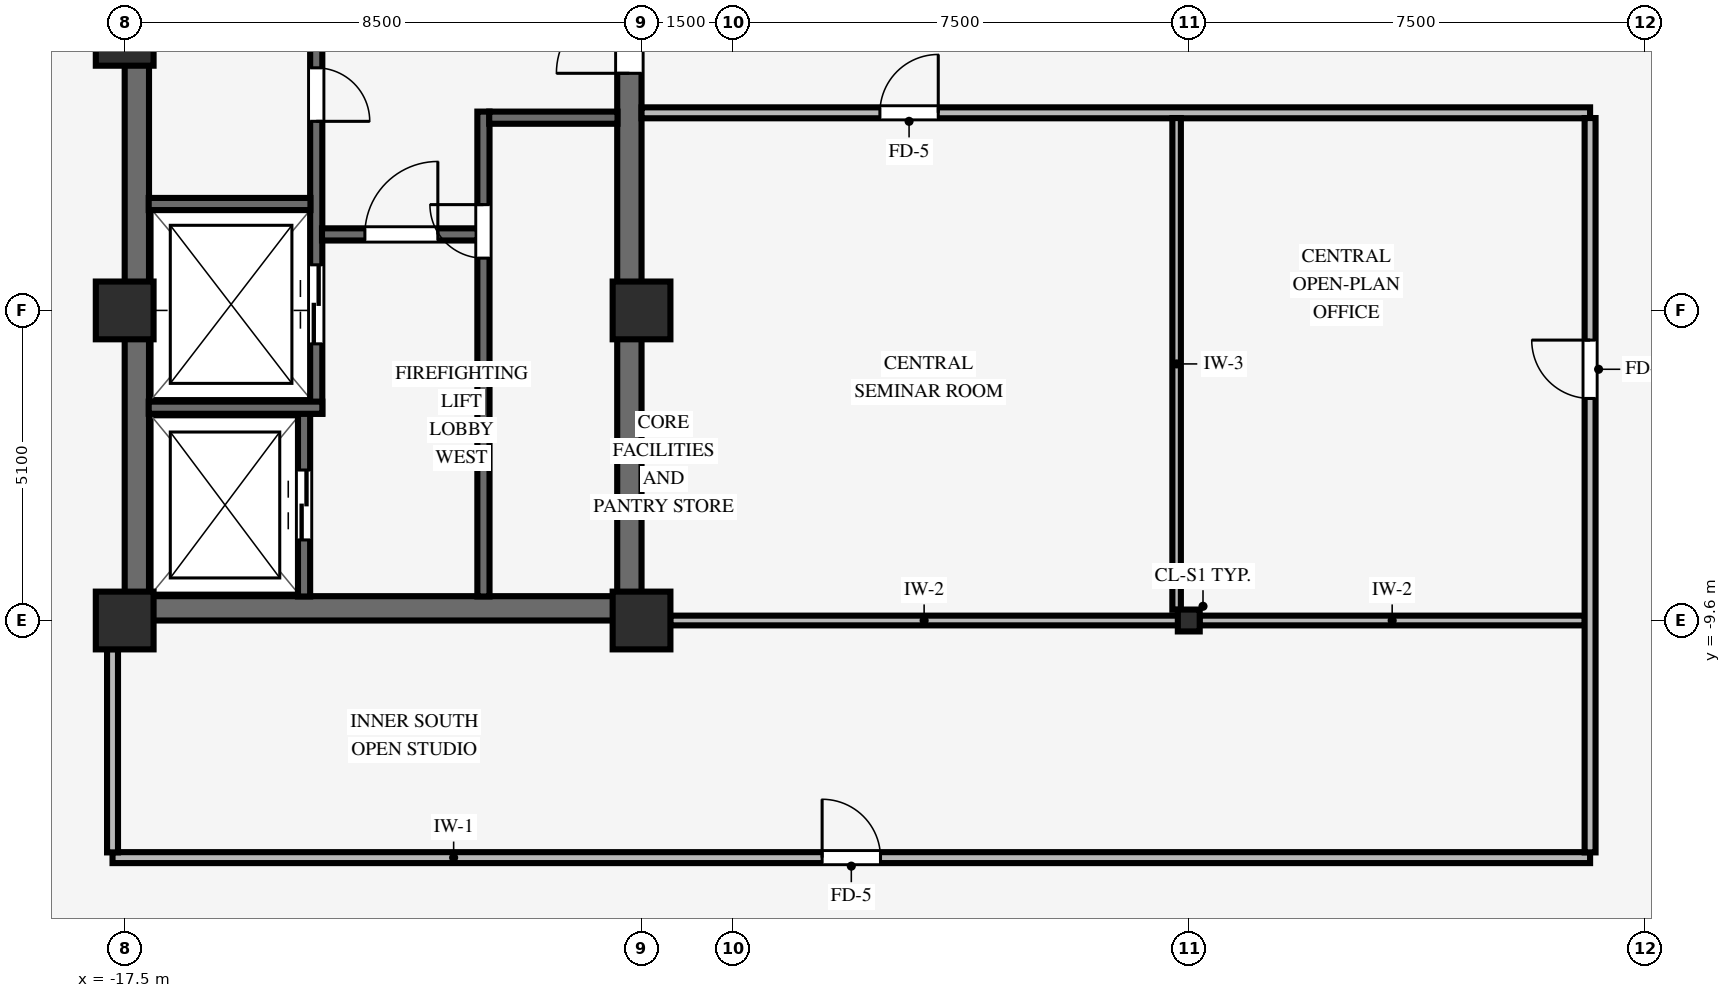
"""IFC4 building model, lengths in metres.
Left out: names, types, materials, properties, quantities, classifications, styles, units other than length and angle.
Written with IfcOpenShell. Run it as: python <this file> out.ifc"""

import sys

from ifc_helpers import new_model, si_unit, direction, frame, frame_2d, origin, origin_2d, place, context, subcontext, project, spatial, rectangle, i_section, extrude, source, transform, mapped, element, fill, save


model = new_model("IFC4")
c1 = context("Model", 3, precision=1e-05, world=origin(), true_north=direction((0.0, 1.0)))
c2 = subcontext(c1, "Body", "Model", "MODEL_VIEW")
j1 = project(units=[si_unit("LENGTHUNIT", "METRE"), si_unit("PLANEANGLEUNIT", "RADIAN")], contexts=[c1])
p1 = place(None, origin())
s1 = spatial("IfcSite", under=j1, at=p1, CompositionType="ELEMENT")
p2 = place(p1, origin())
s2 = spatial("IfcBuilding", under=s1, at=p2, CompositionType="ELEMENT")
p3 = place(p2, frame((0.0, 0.0, 142.1)))
s3 = spatial("IfcBuildingStorey", under=s2, at=p3, CompositionType="ELEMENT", Elevation=142.1)
p4 = place(p3, frame((-17.5, -9.4, 0.0), z_axis=(0.0, 0.0, 1.0), x_axis=(1.0, 0.0, 0.0)))
e1 = element("IfcWall", 1, at=p4, inside=s3, PredefinedType="SHEAR", context=c2, shape_type="SweptSolid", body=[
    extrude(rectangle(XDim=8.5, YDim=0.4, at=frame_2d((4.25, 0.0))), origin(), (0.0, 0.0, 1.0), 3.37),
])
p5 = place(p3, frame((-17.3, -9.205, 0.0), z_axis=(0.0, 0.0, 1.0), x_axis=(0.0, 1.0, 0.0)))
e2 = element("IfcWall", 2, at=p5, inside=s3, PredefinedType="SHEAR", context=c2, shape_type="SweptSolid", body=[
    extrude(rectangle(XDim=18.41, YDim=0.4, at=frame_2d((9.205, 0.0))), origin(), (0.0, 0.0, 1.0), 3.37),
])
p6 = place(p3, frame((-9.2, -9.205, 0.0), z_axis=(0.0, 0.0, 1.0), x_axis=(0.0, 1.0, 0.0)))
e3 = element("IfcWall", 3, at=p6, inside=s3, PredefinedType="SHEAR", context=c2, shape_type="SweptSolid", body=[
    extrude(rectangle(XDim=18.41, YDim=0.4, at=frame_2d((9.205, 0.0))), origin(), (0.0, 0.0, 1.0), 3.37),
])
p7 = place(p6, frame((8.605, 0.0, 0.0)))
e4 = element("IfcOpeningElement", 4, at=p7, cuts=e3, PredefinedType="OPENING", context=c2, shape_type="SweptSolid", body=[
    extrude(rectangle(XDim=1.2, YDim=2.15, at=frame_2d((0.6, 1.075))), frame((0.0, 0.21, 0.0), z_axis=(0.0, -1.0, 0.0), x_axis=(1.0, 0.0, 0.0)), (0.0, 0.0, 1.0), 0.42),
])
for number, where, z_axis, x_axis in (
    (5, (-17.5, -9.6, 0.0), (0.0, 0.0, 1.0), (1.0, 0.0, 0.0)),
    (6, (-17.5, -4.5, 0.0), (0.0, 0.0, 1.0), (1.0, 0.0, 0.0)),
    (7, (-9.0, -9.6, 0.0), (0.0, 0.0, 1.0), (1.0, 0.0, 0.0)),
    (8, (-9.0, -4.5, 0.0), (0.0, 0.0, 1.0), (1.0, 0.0, 0.0)),
    (9, (-17.5, 0.0, 0.0), (0.0, 0.0, 1.0), (1.0, 0.0, 0.0)),
):
    element("IfcColumn", number, at=place(p3, frame(where, z_axis=z_axis, x_axis=x_axis)), inside=s3, PredefinedType="COLUMN", context=c2, shape_type="SweptSolid", body=[
        extrude(rectangle(XDim=0.95, YDim=0.95, at=origin_2d()), origin(), (0.0, 0.0, 1.0), 3.37),
    ])
p8 = place(p3, frame((0.0, -9.6, 0.0), z_axis=(0.0, 0.0, 1.0), x_axis=(1.0, 0.0, 0.0)))
e10 = element("IfcColumn", 10, at=p8, inside=s3, PredefinedType="COLUMN", context=c2, shape_type="SweptSolid", body=[
    extrude(i_section(OverallWidth=0.36, OverallDepth=0.36, WebThickness=0.021, FlangeThickness=0.021, FilletRadius=0.018, at=origin_2d()), origin(), (0.0, 0.0, 1.0), 3.37),
])
p9 = place(p3, frame((-14.55, -9.205, 0.0), z_axis=(0.0, 0.0, 1.0), x_axis=(0.0, 1.0, 0.0)))
e11 = element("IfcWall", 11, at=p9, inside=s3, PredefinedType="SHEAR", context=c2, shape_type="SweptSolid", body=[
    extrude(rectangle(XDim=3.01, YDim=0.2, at=frame_2d((1.505, 0.0))), origin(), (0.0, 0.0, 1.0), 3.37),
])
p10 = place(p9, frame((0.93, 0.0, 0.0)))
e12 = element("IfcOpeningElement", 12, at=p10, cuts=e11, PredefinedType="OPENING", context=c2, shape_type="SweptSolid", body=[
    extrude(rectangle(XDim=1.15, YDim=2.15, at=frame_2d((0.575, 1.075))), frame((0.0, 0.11, 0.0), z_axis=(0.0, -1.0, 0.0), x_axis=(1.0, 0.0, 0.0)), (0.0, 0.0, 1.0), 0.22),
])
p11 = place(p3, frame((-14.35, -6.2, 0.0), z_axis=(0.0, 0.0, 1.0), x_axis=(0.0, 1.0, 0.0)))
e13 = element("IfcWall", 13, at=p11, inside=s3, PredefinedType="SHEAR", context=c2, shape_type="SweptSolid", body=[
    extrude(rectangle(XDim=7.105, YDim=0.2, at=frame_2d((3.552, 0.0))), origin(), (0.0, 0.0, 1.0), 3.37),
])
p12 = place(p11, frame((5.69, 0.0, 0.0), z_axis=(0.0, 0.0, 1.0), x_axis=(-1.0, 0.0, 0.0)))
e14 = element("IfcOpeningElement", 14, at=p12, cuts=e13, PredefinedType="OPENING", context=c2, shape_type="SweptSolid", body=[
    extrude(rectangle(XDim=0.88, YDim=2.1, at=frame_2d((0.44, 1.05))), frame((0.0, 0.11, 0.0), z_axis=(0.0, -1.0, 0.0), x_axis=(1.0, 0.0, 0.0)), (0.0, 0.0, 1.0), 0.22),
])
p13 = place(p11, frame((1.15, 0.0, 0.0)))
e15 = element("IfcOpeningElement", 15, at=p13, cuts=e13, PredefinedType="OPENING", context=c2, shape_type="SweptSolid", body=[
    extrude(rectangle(XDim=1.3, YDim=2.2, at=frame_2d((0.65, 1.1))), frame((0.0, 0.11, 0.0), z_axis=(0.0, -1.0, 0.0), x_axis=(1.0, 0.0, 0.0)), (0.0, 0.0, 1.0), 0.22),
])
p14 = place(p3, frame((-17.105, -6.1, 0.0), z_axis=(0.0, 0.0, 1.0), x_axis=(1.0, 0.0, 0.0)))
e16 = element("IfcWall", 16, at=p14, inside=s3, PredefinedType="SHEAR", context=c2, shape_type="SweptSolid", body=[
    extrude(rectangle(XDim=2.855, YDim=0.2, at=frame_2d((1.427, 0.0))), origin(), (0.0, 0.0, 1.0), 3.37),
])
p15 = place(p3, frame((-17.105, -2.75, 0.0), z_axis=(0.0, 0.0, 1.0), x_axis=(1.0, 0.0, 0.0)))
e17 = element("IfcWall", 17, at=p15, inside=s3, PredefinedType="SHEAR", context=c2, shape_type="SweptSolid", body=[
    extrude(rectangle(XDim=2.66, YDim=0.2, at=frame_2d((1.33, 0.0))), origin(), (0.0, 0.0, 1.0), 3.37),
])
p16 = place(p3, frame((-11.6, -9.205, 0.0), z_axis=(0.0, 0.0, 1.0), x_axis=(0.0, 1.0, 0.0)))
e18 = element("IfcWall", 18, at=p16, inside=s3, PredefinedType="SHEAR", context=c2, shape_type="SweptSolid", body=[
    extrude(rectangle(XDim=7.975, YDim=0.2, at=frame_2d((3.988, 0.0))), origin(), (0.0, 0.0, 1.0), 3.37),
])
p17 = place(p16, frame((5.565, 0.0, 0.0)))
e19 = element("IfcOpeningElement", 19, at=p17, cuts=e18, PredefinedType="OPENING", context=c2, shape_type="SweptSolid", body=[
    extrude(rectangle(XDim=0.88, YDim=2.1, at=frame_2d((0.44, 1.05))), frame((0.0, 0.11, 0.0), z_axis=(0.0, -1.0, 0.0), x_axis=(1.0, 0.0, 0.0)), (0.0, 0.0, 1.0), 0.22),
])
p18 = place(p3, frame((-14.255, -3.25, 0.0), z_axis=(0.0, 0.0, 1.0), x_axis=(1.0, 0.0, 0.0)))
e20 = element("IfcWall", 20, at=p18, inside=s3, PredefinedType="SHEAR", context=c2, shape_type="SweptSolid", body=[
    extrude(rectangle(XDim=2.56, YDim=0.2, at=frame_2d((1.28, 0.0))), origin(), (0.0, 0.0, 1.0), 3.37),
])
p19 = place(p18, frame((0.705, 0.0, 0.0)))
e21 = element("IfcOpeningElement", 21, at=p19, cuts=e20, PredefinedType="OPENING", context=c2, shape_type="SweptSolid", body=[
    extrude(rectangle(XDim=1.2, YDim=2.15, at=frame_2d((0.6, 1.075))), frame((0.0, 0.11, 0.0), z_axis=(0.0, -1.0, 0.0), x_axis=(1.0, 0.0, 0.0)), (0.0, 0.0, 1.0), 0.22),
])
p20 = place(p3, frame((-11.505, -1.33, 0.0), z_axis=(0.0, 0.0, 1.0), x_axis=(1.0, 0.0, 0.0)))
e22 = element("IfcWall", 22, at=p20, inside=s3, PredefinedType="SHEAR", context=c2, shape_type="SweptSolid", body=[
    extrude(rectangle(XDim=2.11, YDim=0.2, at=frame_2d((1.055, 0.0))), origin(), (0.0, 0.0, 1.0), 3.37),
])
p21 = place(p3, frame((-17.7, -13.5, 0.0), z_axis=(0.0, 0.0, 1.0), x_axis=(1.0, 0.0, 0.0)))
e23 = element("IfcWall", 23, at=p21, inside=s3, PredefinedType="PARTITIONING", context=c2, shape_type="SweptSolid", body=[
    extrude(rectangle(XDim=24.3, YDim=0.18, at=frame_2d((12.15, 0.0))), origin(), (0.0, 0.0, 1.0), 2.998),
])
p22 = place(p21, frame((11.67, 0.0, 0.0)))
e24 = element("IfcOpeningElement", 24, at=p22, cuts=e23, PredefinedType="OPENING", context=c2, shape_type="SweptSolid", body=[
    extrude(rectangle(XDim=0.96, YDim=2.1, at=frame_2d((0.48, 1.05))), frame((0.0, 0.1, 0.0), z_axis=(0.0, -1.0, 0.0), x_axis=(1.0, 0.0, 0.0)), (0.0, 0.0, 1.0), 0.2),
])
p23 = place(p3, frame((-8.529, -9.6, 0.0), z_axis=(0.0, 0.0, 1.0), x_axis=(1.0, 0.0, 0.0)))
e25 = element("IfcWall", 25, at=p23, inside=s3, PredefinedType="PARTITIONING", context=c2, shape_type="SweptSolid", body=[
    extrude(rectangle(XDim=8.353, YDim=0.16, at=frame_2d((4.177, 0.0))), origin(), (0.0, 0.0, 1.0), 2.405),
])
p24 = place(p3, frame((0.176, -9.6, 0.0), z_axis=(0.0, 0.0, 1.0), x_axis=(1.0, 0.0, 0.0)))
e26 = element("IfcWall", 26, at=p24, inside=s3, PredefinedType="PARTITIONING", context=c2, shape_type="SweptSolid", body=[
    extrude(rectangle(XDim=6.338, YDim=0.16, at=frame_2d((3.169, 0.0))), origin(), (0.0, 0.0, 1.0), 2.405),
])
p25 = place(p3, frame((-9.0, -1.25, 0.0), z_axis=(0.0, 0.0, 1.0), x_axis=(1.0, 0.0, 0.0)))
e27 = element("IfcWall", 27, at=p25, inside=s3, PredefinedType="PARTITIONING", context=c2, shape_type="SweptSolid", body=[
    extrude(rectangle(XDim=15.6, YDim=0.18, at=frame_2d((7.8, 0.0))), origin(), (0.0, 0.0, 1.0), 3.36),
])
p26 = place(p25, frame((3.92, 0.0, 0.0)))
e28 = element("IfcOpeningElement", 28, at=p26, cuts=e27, PredefinedType="OPENING", context=c2, shape_type="SweptSolid", body=[
    extrude(rectangle(XDim=0.96, YDim=2.1, at=frame_2d((0.48, 1.05))), frame((0.0, 0.1, 0.0), z_axis=(0.0, -1.0, 0.0), x_axis=(1.0, 0.0, 0.0)), (0.0, 0.0, 1.0), 0.2),
])
p27 = place(p3, frame((-17.7, -13.414, 0.0), z_axis=(0.0, 0.0, 1.0), x_axis=(0.0, 1.0, 0.0)))
e29 = element("IfcWall", 29, at=p27, inside=s3, PredefinedType="PARTITIONING", context=c2, shape_type="SweptSolid", body=[
    extrude(rectangle(XDim=3.343, YDim=0.18, at=frame_2d((1.671, 0.0))), origin(), (0.0, 0.0, 1.0), 2.816),
])
p28 = place(p3, frame((-0.2, -9.424, 0.0), z_axis=(0.0, 0.0, 1.0), x_axis=(0.0, 1.0, 0.0)))
e30 = element("IfcWall", 30, at=p28, inside=s3, PredefinedType="PARTITIONING", context=c2, shape_type="SweptSolid", body=[
    extrude(rectangle(XDim=8.088, YDim=0.14, at=frame_2d((4.044, 0.0))), origin(), (0.0, 0.0, 1.0), 2.816),
])
p29 = place(p3, frame((6.6, -13.414, 0.0), z_axis=(0.0, 0.0, 1.0), x_axis=(0.0, 1.0, 0.0)))
e31 = element("IfcWall", 31, at=p29, inside=s3, PredefinedType="PARTITIONING", context=c2, shape_type="SweptSolid", body=[
    extrude(rectangle(XDim=12.078, YDim=0.18, at=frame_2d((6.039, 0.0))), origin(), (0.0, 0.0, 1.0), 3.36),
])
p30 = place(p29, frame((7.466, 0.0, 0.0)))
e32 = element("IfcOpeningElement", 32, at=p30, cuts=e31, PredefinedType="OPENING", context=c2, shape_type="SweptSolid", body=[
    extrude(rectangle(XDim=0.96, YDim=2.1, at=frame_2d((0.48, 1.05))), frame((0.0, 0.1, 0.0), z_axis=(0.0, -1.0, 0.0), x_axis=(1.0, 0.0, 0.0)), (0.0, 0.0, 1.0), 0.2),
])
m1 = source(origin(), c2, "Body", "SweptSolid", [
    extrude(rectangle(XDim=0.88, YDim=2.1, at=frame_2d((0.44, 1.05))), frame((0.0, 0.025, 0.0), z_axis=(0.0, -1.0, 0.0), x_axis=(1.0, 0.0, 0.0)), (0.0, 0.0, 1.0), 0.05),
])
p31 = place(p12, origin())
e33 = element("IfcDoor", 33, at=p31, inside=s3, OperationType="SINGLE_SWING_RIGHT", PredefinedType="DOOR", context=c2, shape_type="MappedRepresentation", body=[
    mapped(m1, transform((0.0, 0.0, 0.0), scale=1.0)),
])
fill(e14, e33)
m2 = source(origin(), c2, "Body", "SweptSolid", [
    extrude(rectangle(XDim=1.2, YDim=2.15, at=frame_2d((0.6, 1.075))), frame((0.0, 0.025, 0.0), z_axis=(0.0, -1.0, 0.0), x_axis=(1.0, 0.0, 0.0)), (0.0, 0.0, 1.0), 0.05),
])
p32 = place(p19, origin())
e34 = element("IfcDoor", 34, at=p32, inside=s3, OperationType="SINGLE_SWING_RIGHT", PredefinedType="DOOR", context=c2, shape_type="MappedRepresentation", body=[
    mapped(m2, transform((0.0, 0.0, 0.0), scale=1.0)),
])
fill(e21, e34)
p33 = place(p17, origin())
e35 = element("IfcDoor", 35, at=p33, inside=s3, OperationType="SINGLE_SWING_RIGHT", PredefinedType="DOOR", context=c2, shape_type="MappedRepresentation", body=[
    mapped(m1, transform((0.0, 0.0, 0.0), scale=1.0)),
])
fill(e19, e35)
p34 = place(p7, origin())
e36 = element("IfcDoor", 36, at=p34, inside=s3, OperationType="SINGLE_SWING_LEFT", PredefinedType="DOOR", context=c2, shape_type="MappedRepresentation", body=[
    mapped(m2, transform((0.0, 0.0, 0.0), scale=1.0)),
])
fill(e4, e36)
m3 = source(origin(), c2, "Body", "SweptSolid", [
    extrude(rectangle(XDim=1.15, YDim=2.15, at=frame_2d((0.575, 1.075))), frame((0.0, 0.025, 0.0), z_axis=(0.0, -1.0, 0.0), x_axis=(1.0, 0.0, 0.0)), (0.0, 0.0, 1.0), 0.05),
])
p35 = place(p10, origin())
e37 = element("IfcDoor", 37, at=p35, inside=s3, OperationType="DOUBLE_DOOR_SLIDING", PredefinedType="DOOR", context=c2, shape_type="MappedRepresentation", body=[
    mapped(m3, transform((0.0, 0.0, 0.0), scale=1.0)),
])
fill(e12, e37)
m4 = source(origin(), c2, "Body", "SweptSolid", [
    extrude(rectangle(XDim=1.3, YDim=2.2, at=frame_2d((0.65, 1.1))), frame((0.0, 0.025, 0.0), z_axis=(0.0, -1.0, 0.0), x_axis=(1.0, 0.0, 0.0)), (0.0, 0.0, 1.0), 0.05),
])
p36 = place(p13, origin())
e38 = element("IfcDoor", 38, at=p36, inside=s3, OperationType="DOUBLE_DOOR_SLIDING", PredefinedType="DOOR", context=c2, shape_type="MappedRepresentation", body=[
    mapped(m4, transform((0.0, 0.0, 0.0), scale=1.0)),
])
fill(e15, e38)
m5 = source(origin(), c2, "Body", "SweptSolid", [
    extrude(rectangle(XDim=0.96, YDim=2.1, at=frame_2d((0.48, 1.05))), frame((0.0, 0.025, 0.0), z_axis=(0.0, -1.0, 0.0), x_axis=(1.0, 0.0, 0.0)), (0.0, 0.0, 1.0), 0.05),
])
p37 = place(p22, origin())
e39 = element("IfcDoor", 39, at=p37, inside=s3, OperationType="SINGLE_SWING_LEFT", PredefinedType="DOOR", context=c2, shape_type="MappedRepresentation", body=[
    mapped(m5, transform((0.0, 0.0, 0.0), scale=1.0)),
])
fill(e24, e39)
p38 = place(p26, origin())
e40 = element("IfcDoor", 40, at=p38, inside=s3, OperationType="SINGLE_SWING_RIGHT", PredefinedType="DOOR", context=c2, shape_type="MappedRepresentation", body=[
    mapped(m5, transform((0.0, 0.0, 0.0), scale=1.0)),
])
fill(e28, e40)
p39 = place(p30, origin())
e41 = element("IfcDoor", 41, at=p39, inside=s3, OperationType="SINGLE_SWING_RIGHT", PredefinedType="DOOR", context=c2, shape_type="MappedRepresentation", body=[
    mapped(m5, transform((0.0, 0.0, 0.0), scale=1.0)),
])
fill(e32, e41)
save(model, sys.argv[1])
